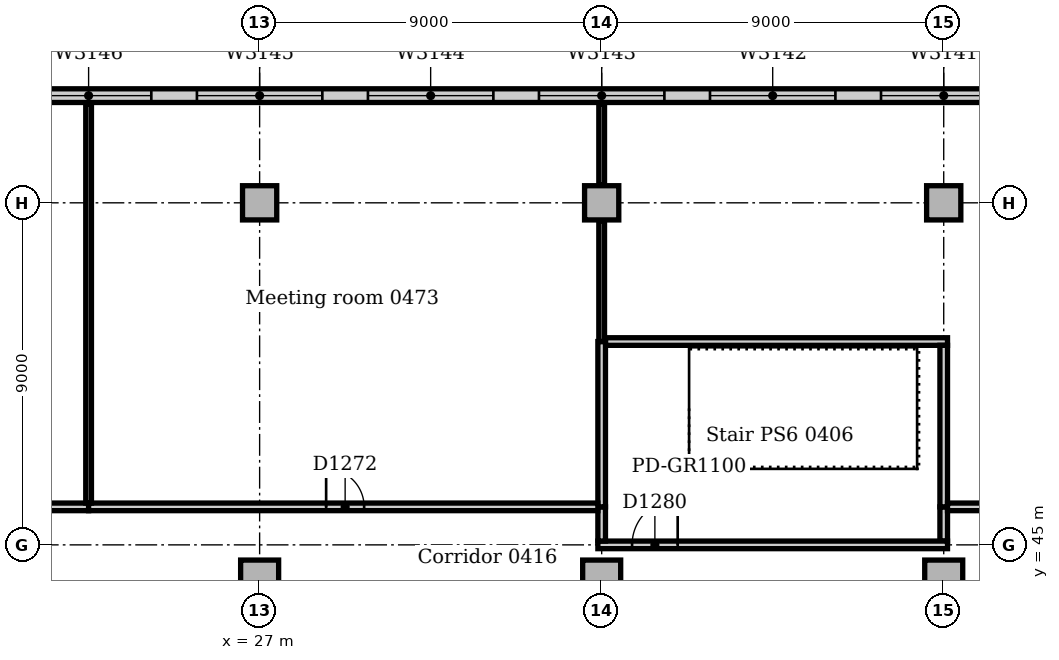
"""IFC4 building model, lengths in metres.
Left out: names, types, materials, properties, quantities, classifications, styles, units other than length and angle.
Written with IfcOpenShell. Run it as: python <this file> out.ifc"""

import sys

from ifc_helpers import new_model, si_unit, direction, frame, frame_2d, origin, origin_2d, place, context, subcontext, project, spatial, rectangle, extrude, element, fill, save


model = new_model("IFC4")
c1 = context("Model", 3, precision=1e-05, world=origin(), true_north=direction((0.0, 1.0)))
c2 = subcontext(c1, "Body", "Model", "MODEL_VIEW")
j1 = project(units=[si_unit("LENGTHUNIT", "METRE"), si_unit("PLANEANGLEUNIT", "RADIAN")], contexts=[c1])
p1 = place(None, origin())
s1 = spatial("IfcSite", under=j1, at=p1, CompositionType="ELEMENT")
p2 = place(p1, origin())
s2 = spatial("IfcBuilding", under=s1, at=p2, CompositionType="ELEMENT")
p3 = place(p2, frame((0.0, 0.0, 21.0)))
s3 = spatial("IfcBuildingStorey", under=s2, at=p3, CompositionType="ELEMENT", Elevation=21.0)
for number, where, z_axis, x_axis in (
    (1, (27.0, 44.1, 0.0), (0.0, 0.0, 1.0), (1.0, 0.0, 0.0)),
    (2, (36.0, 44.1, 0.0), (0.0, 0.0, 1.0), (1.0, 0.0, 0.0)),
    (3, (45.0, 44.1, 0.0), (0.0, 0.0, 1.0), (1.0, 0.0, 0.0)),
):
    element("IfcColumn", number, at=place(p3, frame(where, z_axis=z_axis, x_axis=x_axis)), inside=s3, PredefinedType="COLUMN", context=c2, shape_type="SweptSolid", body=[
        extrude(rectangle(XDim=1.0, YDim=1.0, at=origin_2d()), origin(), (0.0, 0.0, 1.0), 4.85),
    ])
for number, where, z_axis, x_axis in (
    (4, (27.0, 54.0, 0.0), (0.0, 0.0, 1.0), (1.0, 0.0, 0.0)),
    (5, (36.0, 54.0, 0.0), (0.0, 0.0, 1.0), (1.0, 0.0, 0.0)),
    (6, (45.0, 54.0, 0.0), (0.0, 0.0, 1.0), (1.0, 0.0, 0.0)),
):
    element("IfcColumn", number, at=place(p3, frame(where, z_axis=z_axis, x_axis=x_axis)), inside=s3, PredefinedType="COLUMN", context=c2, shape_type="SweptSolid", body=[
        extrude(rectangle(XDim=0.9, YDim=0.9, at=origin_2d()), origin(), (0.0, 0.0, 1.0), 4.7),
    ])
p4 = place(p3, frame((63.0, 56.82, 0.0), z_axis=(0.0, 0.0, 1.0), x_axis=(-1.0, 0.0, 0.0)))
e7 = element("IfcWall", 7, at=p4, inside=s3, PredefinedType="STANDARD", context=c2, shape_type="SweptSolid", body=[
    extrude(rectangle(XDim=144.0, YDim=0.36, at=frame_2d((72.0, 0.0))), origin(), (0.0, 0.0, 1.0), 4.85),
])
p5 = place(p4, frame((2.85, 0.0, 0.9)))
e8 = element("IfcOpeningElement", 8, at=p5, cuts=e7, PredefinedType="OPENING", context=c2, shape_type="SweptSolid", body=[
    extrude(rectangle(XDim=3.3, YDim=2.4, at=frame_2d((1.65, 1.2))), frame((0.0, 0.19, 0.0), z_axis=(0.0, -1.0, 0.0), x_axis=(1.0, 0.0, 0.0)), (0.0, 0.0, 1.0), 0.38),
])
p6 = place(p4, frame((7.35, 0.0, 0.9)))
e9 = element("IfcOpeningElement", 9, at=p6, cuts=e7, PredefinedType="OPENING", context=c2, shape_type="SweptSolid", body=[
    extrude(rectangle(XDim=3.3, YDim=2.4, at=frame_2d((1.65, 1.2))), frame((0.0, 0.19, 0.0), z_axis=(0.0, -1.0, 0.0), x_axis=(1.0, 0.0, 0.0)), (0.0, 0.0, 1.0), 0.38),
])
p7 = place(p4, frame((11.85, 0.0, 0.9)))
e10 = element("IfcOpeningElement", 10, at=p7, cuts=e7, PredefinedType="OPENING", context=c2, shape_type="SweptSolid", body=[
    extrude(rectangle(XDim=3.3, YDim=2.4, at=frame_2d((1.65, 1.2))), frame((0.0, 0.19, 0.0), z_axis=(0.0, -1.0, 0.0), x_axis=(1.0, 0.0, 0.0)), (0.0, 0.0, 1.0), 0.38),
])
p8 = place(p4, frame((16.35, 0.0, 0.9)))
e11 = element("IfcOpeningElement", 11, at=p8, cuts=e7, PredefinedType="OPENING", context=c2, shape_type="SweptSolid", body=[
    extrude(rectangle(XDim=3.3, YDim=2.4, at=frame_2d((1.65, 1.2))), frame((0.0, 0.19, 0.0), z_axis=(0.0, -1.0, 0.0), x_axis=(1.0, 0.0, 0.0)), (0.0, 0.0, 1.0), 0.38),
])
p9 = place(p4, frame((20.85, 0.0, 0.9)))
e12 = element("IfcOpeningElement", 12, at=p9, cuts=e7, PredefinedType="OPENING", context=c2, shape_type="SweptSolid", body=[
    extrude(rectangle(XDim=3.3, YDim=2.4, at=frame_2d((1.65, 1.2))), frame((0.0, 0.19, 0.0), z_axis=(0.0, -1.0, 0.0), x_axis=(1.0, 0.0, 0.0)), (0.0, 0.0, 1.0), 0.38),
])
p10 = place(p4, frame((25.35, 0.0, 0.9)))
e13 = element("IfcOpeningElement", 13, at=p10, cuts=e7, PredefinedType="OPENING", context=c2, shape_type="SweptSolid", body=[
    extrude(rectangle(XDim=3.3, YDim=2.4, at=frame_2d((1.65, 1.2))), frame((0.0, 0.19, 0.0), z_axis=(0.0, -1.0, 0.0), x_axis=(1.0, 0.0, 0.0)), (0.0, 0.0, 1.0), 0.38),
])
p11 = place(p4, frame((29.85, 0.0, 0.9)))
e14 = element("IfcOpeningElement", 14, at=p11, cuts=e7, PredefinedType="OPENING", context=c2, shape_type="SweptSolid", body=[
    extrude(rectangle(XDim=3.3, YDim=2.4, at=frame_2d((1.65, 1.2))), frame((0.0, 0.19, 0.0), z_axis=(0.0, -1.0, 0.0), x_axis=(1.0, 0.0, 0.0)), (0.0, 0.0, 1.0), 0.38),
])
p12 = place(p4, frame((34.35, 0.0, 0.9)))
e15 = element("IfcOpeningElement", 15, at=p12, cuts=e7, PredefinedType="OPENING", context=c2, shape_type="SweptSolid", body=[
    extrude(rectangle(XDim=3.3, YDim=2.4, at=frame_2d((1.65, 1.2))), frame((0.0, 0.19, 0.0), z_axis=(0.0, -1.0, 0.0), x_axis=(1.0, 0.0, 0.0)), (0.0, 0.0, 1.0), 0.38),
])
p13 = place(p4, frame((38.85, 0.0, 0.9)))
e16 = element("IfcOpeningElement", 16, at=p13, cuts=e7, PredefinedType="OPENING", context=c2, shape_type="SweptSolid", body=[
    extrude(rectangle(XDim=3.3, YDim=2.4, at=frame_2d((1.65, 1.2))), frame((0.0, 0.19, 0.0), z_axis=(0.0, -1.0, 0.0), x_axis=(1.0, 0.0, 0.0)), (0.0, 0.0, 1.0), 0.38),
])
p14 = place(p4, frame((43.35, 0.0, 0.9)))
e17 = element("IfcOpeningElement", 17, at=p14, cuts=e7, PredefinedType="OPENING", context=c2, shape_type="SweptSolid", body=[
    extrude(rectangle(XDim=3.3, YDim=2.4, at=frame_2d((1.65, 1.2))), frame((0.0, 0.19, 0.0), z_axis=(0.0, -1.0, 0.0), x_axis=(1.0, 0.0, 0.0)), (0.0, 0.0, 1.0), 0.38),
])
p15 = place(p4, frame((47.85, 0.0, 0.9)))
e18 = element("IfcOpeningElement", 18, at=p15, cuts=e7, PredefinedType="OPENING", context=c2, shape_type="SweptSolid", body=[
    extrude(rectangle(XDim=3.3, YDim=2.4, at=frame_2d((1.65, 1.2))), frame((0.0, 0.19, 0.0), z_axis=(0.0, -1.0, 0.0), x_axis=(1.0, 0.0, 0.0)), (0.0, 0.0, 1.0), 0.38),
])
p16 = place(p4, frame((52.35, 0.0, 0.9)))
e19 = element("IfcOpeningElement", 19, at=p16, cuts=e7, PredefinedType="OPENING", context=c2, shape_type="SweptSolid", body=[
    extrude(rectangle(XDim=3.3, YDim=2.4, at=frame_2d((1.65, 1.2))), frame((0.0, 0.19, 0.0), z_axis=(0.0, -1.0, 0.0), x_axis=(1.0, 0.0, 0.0)), (0.0, 0.0, 1.0), 0.38),
])
p17 = place(p4, frame((56.85, 0.0, 0.9)))
e20 = element("IfcOpeningElement", 20, at=p17, cuts=e7, PredefinedType="OPENING", context=c2, shape_type="SweptSolid", body=[
    extrude(rectangle(XDim=3.3, YDim=2.4, at=frame_2d((1.65, 1.2))), frame((0.0, 0.19, 0.0), z_axis=(0.0, -1.0, 0.0), x_axis=(1.0, 0.0, 0.0)), (0.0, 0.0, 1.0), 0.38),
])
p18 = place(p4, frame((61.35, 0.0, 0.9)))
e21 = element("IfcOpeningElement", 21, at=p18, cuts=e7, PredefinedType="OPENING", context=c2, shape_type="SweptSolid", body=[
    extrude(rectangle(XDim=3.3, YDim=2.4, at=frame_2d((1.65, 1.2))), frame((0.0, 0.19, 0.0), z_axis=(0.0, -1.0, 0.0), x_axis=(1.0, 0.0, 0.0)), (0.0, 0.0, 1.0), 0.38),
])
p19 = place(p4, frame((65.85, 0.0, 0.9)))
e22 = element("IfcOpeningElement", 22, at=p19, cuts=e7, PredefinedType="OPENING", context=c2, shape_type="SweptSolid", body=[
    extrude(rectangle(XDim=3.3, YDim=2.4, at=frame_2d((1.65, 1.2))), frame((0.0, 0.19, 0.0), z_axis=(0.0, -1.0, 0.0), x_axis=(1.0, 0.0, 0.0)), (0.0, 0.0, 1.0), 0.38),
])
p20 = place(p4, frame((70.35, 0.0, 0.9)))
e23 = element("IfcOpeningElement", 23, at=p20, cuts=e7, PredefinedType="OPENING", context=c2, shape_type="SweptSolid", body=[
    extrude(rectangle(XDim=3.3, YDim=2.4, at=frame_2d((1.65, 1.2))), frame((0.0, 0.19, 0.0), z_axis=(0.0, -1.0, 0.0), x_axis=(1.0, 0.0, 0.0)), (0.0, 0.0, 1.0), 0.38),
])
p21 = place(p4, frame((74.85, 0.0, 0.9)))
e24 = element("IfcOpeningElement", 24, at=p21, cuts=e7, PredefinedType="OPENING", context=c2, shape_type="SweptSolid", body=[
    extrude(rectangle(XDim=3.3, YDim=2.4, at=frame_2d((1.65, 1.2))), frame((0.0, 0.19, 0.0), z_axis=(0.0, -1.0, 0.0), x_axis=(1.0, 0.0, 0.0)), (0.0, 0.0, 1.0), 0.38),
])
p22 = place(p4, frame((79.35, 0.0, 0.9)))
e25 = element("IfcOpeningElement", 25, at=p22, cuts=e7, PredefinedType="OPENING", context=c2, shape_type="SweptSolid", body=[
    extrude(rectangle(XDim=3.3, YDim=2.4, at=frame_2d((1.65, 1.2))), frame((0.0, 0.19, 0.0), z_axis=(0.0, -1.0, 0.0), x_axis=(1.0, 0.0, 0.0)), (0.0, 0.0, 1.0), 0.38),
])
p23 = place(p4, frame((83.85, 0.0, 0.9)))
e26 = element("IfcOpeningElement", 26, at=p23, cuts=e7, PredefinedType="OPENING", context=c2, shape_type="SweptSolid", body=[
    extrude(rectangle(XDim=3.3, YDim=2.4, at=frame_2d((1.65, 1.2))), frame((0.0, 0.19, 0.0), z_axis=(0.0, -1.0, 0.0), x_axis=(1.0, 0.0, 0.0)), (0.0, 0.0, 1.0), 0.38),
])
p24 = place(p4, frame((88.35, 0.0, 0.9)))
e27 = element("IfcOpeningElement", 27, at=p24, cuts=e7, PredefinedType="OPENING", context=c2, shape_type="SweptSolid", body=[
    extrude(rectangle(XDim=3.3, YDim=2.4, at=frame_2d((1.65, 1.2))), frame((0.0, 0.19, 0.0), z_axis=(0.0, -1.0, 0.0), x_axis=(1.0, 0.0, 0.0)), (0.0, 0.0, 1.0), 0.38),
])
p25 = place(p4, frame((92.85, 0.0, 0.9)))
e28 = element("IfcOpeningElement", 28, at=p25, cuts=e7, PredefinedType="OPENING", context=c2, shape_type="SweptSolid", body=[
    extrude(rectangle(XDim=3.3, YDim=2.4, at=frame_2d((1.65, 1.2))), frame((0.0, 0.19, 0.0), z_axis=(0.0, -1.0, 0.0), x_axis=(1.0, 0.0, 0.0)), (0.0, 0.0, 1.0), 0.38),
])
p26 = place(p4, frame((97.35, 0.0, 0.9)))
e29 = element("IfcOpeningElement", 29, at=p26, cuts=e7, PredefinedType="OPENING", context=c2, shape_type="SweptSolid", body=[
    extrude(rectangle(XDim=3.3, YDim=2.4, at=frame_2d((1.65, 1.2))), frame((0.0, 0.19, 0.0), z_axis=(0.0, -1.0, 0.0), x_axis=(1.0, 0.0, 0.0)), (0.0, 0.0, 1.0), 0.38),
])
p27 = place(p4, frame((101.85, 0.0, 0.9)))
e30 = element("IfcOpeningElement", 30, at=p27, cuts=e7, PredefinedType="OPENING", context=c2, shape_type="SweptSolid", body=[
    extrude(rectangle(XDim=3.3, YDim=2.4, at=frame_2d((1.65, 1.2))), frame((0.0, 0.19, 0.0), z_axis=(0.0, -1.0, 0.0), x_axis=(1.0, 0.0, 0.0)), (0.0, 0.0, 1.0), 0.38),
])
p28 = place(p4, frame((106.35, 0.0, 0.9)))
e31 = element("IfcOpeningElement", 31, at=p28, cuts=e7, PredefinedType="OPENING", context=c2, shape_type="SweptSolid", body=[
    extrude(rectangle(XDim=3.3, YDim=2.4, at=frame_2d((1.65, 1.2))), frame((0.0, 0.19, 0.0), z_axis=(0.0, -1.0, 0.0), x_axis=(1.0, 0.0, 0.0)), (0.0, 0.0, 1.0), 0.38),
])
p29 = place(p4, frame((110.85, 0.0, 0.9)))
e32 = element("IfcOpeningElement", 32, at=p29, cuts=e7, PredefinedType="OPENING", context=c2, shape_type="SweptSolid", body=[
    extrude(rectangle(XDim=3.3, YDim=2.4, at=frame_2d((1.65, 1.2))), frame((0.0, 0.19, 0.0), z_axis=(0.0, -1.0, 0.0), x_axis=(1.0, 0.0, 0.0)), (0.0, 0.0, 1.0), 0.38),
])
p30 = place(p4, frame((115.35, 0.0, 0.9)))
e33 = element("IfcOpeningElement", 33, at=p30, cuts=e7, PredefinedType="OPENING", context=c2, shape_type="SweptSolid", body=[
    extrude(rectangle(XDim=3.3, YDim=2.4, at=frame_2d((1.65, 1.2))), frame((0.0, 0.19, 0.0), z_axis=(0.0, -1.0, 0.0), x_axis=(1.0, 0.0, 0.0)), (0.0, 0.0, 1.0), 0.38),
])
p31 = place(p4, frame((119.85, 0.0, 0.9)))
e34 = element("IfcOpeningElement", 34, at=p31, cuts=e7, PredefinedType="OPENING", context=c2, shape_type="SweptSolid", body=[
    extrude(rectangle(XDim=3.3, YDim=2.4, at=frame_2d((1.65, 1.2))), frame((0.0, 0.19, 0.0), z_axis=(0.0, -1.0, 0.0), x_axis=(1.0, 0.0, 0.0)), (0.0, 0.0, 1.0), 0.38),
])
p32 = place(p4, frame((124.35, 0.0, 0.9)))
e35 = element("IfcOpeningElement", 35, at=p32, cuts=e7, PredefinedType="OPENING", context=c2, shape_type="SweptSolid", body=[
    extrude(rectangle(XDim=3.3, YDim=2.4, at=frame_2d((1.65, 1.2))), frame((0.0, 0.19, 0.0), z_axis=(0.0, -1.0, 0.0), x_axis=(1.0, 0.0, 0.0)), (0.0, 0.0, 1.0), 0.38),
])
p33 = place(p4, frame((128.85, 0.0, 0.9)))
e36 = element("IfcOpeningElement", 36, at=p33, cuts=e7, PredefinedType="OPENING", context=c2, shape_type="SweptSolid", body=[
    extrude(rectangle(XDim=3.3, YDim=2.4, at=frame_2d((1.65, 1.2))), frame((0.0, 0.19, 0.0), z_axis=(0.0, -1.0, 0.0), x_axis=(1.0, 0.0, 0.0)), (0.0, 0.0, 1.0), 0.38),
])
p34 = place(p4, frame((133.35, 0.0, 0.9)))
e37 = element("IfcOpeningElement", 37, at=p34, cuts=e7, PredefinedType="OPENING", context=c2, shape_type="SweptSolid", body=[
    extrude(rectangle(XDim=3.3, YDim=2.4, at=frame_2d((1.65, 1.2))), frame((0.0, 0.19, 0.0), z_axis=(0.0, -1.0, 0.0), x_axis=(1.0, 0.0, 0.0)), (0.0, 0.0, 1.0), 0.38),
])
p35 = place(p4, frame((137.85, 0.0, 0.9)))
e38 = element("IfcOpeningElement", 38, at=p35, cuts=e7, PredefinedType="OPENING", context=c2, shape_type="SweptSolid", body=[
    extrude(rectangle(XDim=3.3, YDim=2.4, at=frame_2d((1.65, 1.2))), frame((0.0, 0.19, 0.0), z_axis=(0.0, -1.0, 0.0), x_axis=(1.0, 0.0, 0.0)), (0.0, 0.0, 1.0), 0.38),
])
p36 = place(p3, frame((45.0, 45.1, 0.0), z_axis=(0.0, 0.0, 1.0), x_axis=(0.0, 1.0, 0.0)))
e39 = element("IfcWall", 39, at=p36, inside=s3, PredefinedType="SOLIDWALL", context=c2, shape_type="SweptSolid", body=[
    extrude(rectangle(XDim=0.9, YDim=0.2, at=frame_2d((0.45, 0.0))), origin(), (0.0, 0.0, 1.0), 4.7),
])
p37 = place(p3, frame((35.9, 45.0, 0.0), z_axis=(0.0, 0.0, 1.0), x_axis=(1.0, 0.0, 0.0)))
e40 = element("IfcWall", 40, at=p37, inside=s3, PredefinedType="SOLIDWALL", context=c2, shape_type="SweptSolid", body=[
    extrude(rectangle(XDim=9.2, YDim=0.2, at=frame_2d((4.6, 0.0))), origin(), (0.0, 0.0, 1.0), 4.85),
])
p38 = place(p37, frame((0.9, 0.0, 0.0)))
e41 = element("IfcOpeningElement", 41, at=p38, cuts=e40, PredefinedType="OPENING", context=c2, shape_type="SweptSolid", body=[
    extrude(rectangle(XDim=1.2, YDim=2.1, at=frame_2d((0.6, 1.05))), frame((0.0, 0.11, 0.0), z_axis=(0.0, -1.0, 0.0), x_axis=(1.0, 0.0, 0.0)), (0.0, 0.0, 1.0), 0.22),
])
p39 = place(p3, frame((36.0, 45.1, 0.0), z_axis=(0.0, 0.0, 1.0), x_axis=(0.0, 1.0, 0.0)))
e42 = element("IfcWall", 42, at=p39, inside=s3, PredefinedType="SOLIDWALL", context=c2, shape_type="SweptSolid", body=[
    extrude(rectangle(XDim=0.9, YDim=0.2, at=frame_2d((0.45, 0.0))), origin(), (0.0, 0.0, 1.0), 4.7),
])
p40 = place(p3, frame((36.1, 50.35, 0.0), z_axis=(0.0, 0.0, 1.0), x_axis=(1.0, 0.0, 0.0)))
e43 = element("IfcWall", 43, at=p40, inside=s3, PredefinedType="SOLIDWALL", context=c2, shape_type="SweptSolid", body=[
    extrude(rectangle(XDim=9.0, YDim=0.2, at=frame_2d((4.5, 0.0))), origin(), (0.0, 0.0, 1.0), 4.7),
])
p41 = place(p3, frame((45.0, 46.0, 0.0), z_axis=(0.0, 0.0, 1.0), x_axis=(0.0, 1.0, 0.0)))
e44 = element("IfcWall", 44, at=p41, inside=s3, PredefinedType="SOLIDWALL", context=c2, shape_type="SweptSolid", body=[
    extrude(rectangle(XDim=4.25, YDim=0.2, at=frame_2d((2.125, 0.0))), origin(), (0.0, 0.0, 1.0), 4.7),
])
p42 = place(p3, frame((36.0, 46.0, 0.0), z_axis=(0.0, 0.0, 1.0), x_axis=(0.0, 1.0, 0.0)))
e45 = element("IfcWall", 45, at=p42, inside=s3, PredefinedType="SOLIDWALL", context=c2, shape_type="SweptSolid", body=[
    extrude(rectangle(XDim=4.35, YDim=0.2, at=frame_2d((2.175, 0.0))), origin(), (0.0, 0.0, 1.0), 4.7),
])
p43 = place(p3, frame((45.1, 46.0, 0.0), z_axis=(0.0, 0.0, 1.0), x_axis=(1.0, 0.0, 0.0)))
e46 = element("IfcWall", 46, at=p43, inside=s3, PredefinedType="PARTITIONING", context=c2, shape_type="SweptSolid", body=[
    extrude(rectangle(XDim=8.8, YDim=0.2, at=frame_2d((4.4, 0.0))), origin(), (0.0, 0.0, 1.0), 4.7),
])
p44 = place(p43, frame((3.5, 0.0, 0.0)))
e47 = element("IfcOpeningElement", 47, at=p44, cuts=e46, PredefinedType="OPENING", context=c2, shape_type="SweptSolid", body=[
    extrude(rectangle(XDim=1.8, YDim=2.1, at=frame_2d((0.9, 1.05))), frame((0.0, 0.11, 0.0), z_axis=(0.0, -1.0, 0.0), x_axis=(1.0, 0.0, 0.0)), (0.0, 0.0, 1.0), 0.22),
])
p45 = place(p3, frame((9.0, 46.0, 0.0), z_axis=(0.0, 0.0, 1.0), x_axis=(1.0, 0.0, 0.0)))
e48 = element("IfcWall", 48, at=p45, inside=s3, PredefinedType="PARTITIONING", context=c2, shape_type="SweptSolid", body=[
    extrude(rectangle(XDim=13.5, YDim=0.2, at=frame_2d((6.75, 0.0))), origin(), (0.0, 0.0, 1.0), 4.7),
])
p46 = place(p45, frame((6.25, 0.0, 0.0)))
e49 = element("IfcOpeningElement", 49, at=p46, cuts=e48, PredefinedType="OPENING", context=c2, shape_type="SweptSolid", body=[
    extrude(rectangle(XDim=1.0, YDim=2.1, at=frame_2d((0.5, 1.05))), frame((0.0, 0.11, 0.0), z_axis=(0.0, -1.0, 0.0), x_axis=(1.0, 0.0, 0.0)), (0.0, 0.0, 1.0), 0.22),
])
p47 = place(p3, frame((22.5, 46.0, 0.0), z_axis=(0.0, 0.0, 1.0), x_axis=(1.0, 0.0, 0.0)))
e50 = element("IfcWall", 50, at=p47, inside=s3, PredefinedType="PARTITIONING", context=c2, shape_type="SweptSolid", body=[
    extrude(rectangle(XDim=13.4, YDim=0.2, at=frame_2d((6.7, 0.0))), origin(), (0.0, 0.0, 1.0), 4.7),
])
p48 = place(p47, frame((6.25, 0.0, 0.0)))
e51 = element("IfcOpeningElement", 51, at=p48, cuts=e50, PredefinedType="OPENING", context=c2, shape_type="SweptSolid", body=[
    extrude(rectangle(XDim=1.0, YDim=2.1, at=frame_2d((0.5, 1.05))), frame((0.0, 0.11, 0.0), z_axis=(0.0, -1.0, 0.0), x_axis=(1.0, 0.0, 0.0)), (0.0, 0.0, 1.0), 0.22),
])
p49 = place(p3, frame((36.0, 50.35, 0.0), z_axis=(0.0, 0.0, 1.0), x_axis=(0.0, 1.0, 0.0)))
e52 = element("IfcWall", 52, at=p49, inside=s3, PredefinedType="PARTITIONING", context=c2, shape_type="SweptSolid", body=[
    extrude(rectangle(XDim=3.18, YDim=0.15, at=frame_2d((1.59, 0.0))), origin(), (0.0, 0.0, 1.0), 4.7),
])
p50 = place(p3, frame((36.0, 54.47, 0.0), z_axis=(0.0, 0.0, 1.0), x_axis=(0.0, 1.0, 0.0)))
e53 = element("IfcWall", 53, at=p50, inside=s3, PredefinedType="PARTITIONING", context=c2, shape_type="SweptSolid", body=[
    extrude(rectangle(XDim=2.13, YDim=0.15, at=frame_2d((1.065, 0.0))), origin(), (0.0, 0.0, 1.0), 4.7),
])
p51 = place(p3, frame((22.5, 46.1, 0.0), z_axis=(0.0, 0.0, 1.0), x_axis=(0.0, 1.0, 0.0)))
e54 = element("IfcWall", 54, at=p51, inside=s3, PredefinedType="PARTITIONING", context=c2, shape_type="SweptSolid", body=[
    extrude(rectangle(XDim=10.5, YDim=0.15, at=frame_2d((5.25, 0.0))), origin(), (0.0, 0.0, 1.0), 4.7),
])
p52 = place(p8, origin())
e55 = element("IfcWindow", 55, at=p52, inside=s3, PartitioningType="SINGLE_PANEL", PredefinedType="WINDOW", context=c2, shape_type="SweptSolid", body=[
    extrude(rectangle(XDim=3.3, YDim=2.4, at=frame_2d((1.65, 1.2))), frame((0.0, 0.13, 0.0), z_axis=(0.0, -1.0, 0.0), x_axis=(1.0, 0.0, 0.0)), (0.0, 0.0, 1.0), 0.06),
])
fill(e11, e55)
p53 = place(p9, origin())
e56 = element("IfcWindow", 56, at=p53, inside=s3, PartitioningType="SINGLE_PANEL", PredefinedType="WINDOW", context=c2, shape_type="SweptSolid", body=[
    extrude(rectangle(XDim=3.3, YDim=2.4, at=frame_2d((1.65, 1.2))), frame((0.0, 0.13, 0.0), z_axis=(0.0, -1.0, 0.0), x_axis=(1.0, 0.0, 0.0)), (0.0, 0.0, 1.0), 0.06),
])
fill(e12, e56)
p54 = place(p10, origin())
e57 = element("IfcWindow", 57, at=p54, inside=s3, PartitioningType="SINGLE_PANEL", PredefinedType="WINDOW", context=c2, shape_type="SweptSolid", body=[
    extrude(rectangle(XDim=3.3, YDim=2.4, at=frame_2d((1.65, 1.2))), frame((0.0, 0.13, 0.0), z_axis=(0.0, -1.0, 0.0), x_axis=(1.0, 0.0, 0.0)), (0.0, 0.0, 1.0), 0.06),
])
fill(e13, e57)
p55 = place(p11, origin())
e58 = element("IfcWindow", 58, at=p55, inside=s3, PartitioningType="SINGLE_PANEL", PredefinedType="WINDOW", context=c2, shape_type="SweptSolid", body=[
    extrude(rectangle(XDim=3.3, YDim=2.4, at=frame_2d((1.65, 1.2))), frame((0.0, 0.13, 0.0), z_axis=(0.0, -1.0, 0.0), x_axis=(1.0, 0.0, 0.0)), (0.0, 0.0, 1.0), 0.06),
])
fill(e14, e58)
p56 = place(p12, origin())
e59 = element("IfcWindow", 59, at=p56, inside=s3, PartitioningType="SINGLE_PANEL", PredefinedType="WINDOW", context=c2, shape_type="SweptSolid", body=[
    extrude(rectangle(XDim=3.3, YDim=2.4, at=frame_2d((1.65, 1.2))), frame((0.0, 0.13, 0.0), z_axis=(0.0, -1.0, 0.0), x_axis=(1.0, 0.0, 0.0)), (0.0, 0.0, 1.0), 0.06),
])
fill(e15, e59)
p57 = place(p13, origin())
e60 = element("IfcWindow", 60, at=p57, inside=s3, PartitioningType="SINGLE_PANEL", PredefinedType="WINDOW", context=c2, shape_type="SweptSolid", body=[
    extrude(rectangle(XDim=3.3, YDim=2.4, at=frame_2d((1.65, 1.2))), frame((0.0, 0.13, 0.0), z_axis=(0.0, -1.0, 0.0), x_axis=(1.0, 0.0, 0.0)), (0.0, 0.0, 1.0), 0.06),
])
fill(e16, e60)
p58 = place(p48, origin())
e61 = element("IfcDoor", 61, at=p58, inside=s3, OperationType="SINGLE_SWING_LEFT", PredefinedType="DOOR", context=c2, shape_type="SweptSolid", body=[
    extrude(rectangle(XDim=1.0, YDim=2.1, at=frame_2d((0.5, 1.05))), frame((0.0, 0.025, 0.0), z_axis=(0.0, -1.0, 0.0), x_axis=(1.0, 0.0, 0.0)), (0.0, 0.0, 1.0), 0.05),
])
fill(e51, e61)
p59 = place(p38, origin())
e62 = element("IfcDoor", 62, at=p59, inside=s3, OperationType="SINGLE_SWING_RIGHT", PredefinedType="DOOR", context=c2, shape_type="SweptSolid", body=[
    extrude(rectangle(XDim=1.2, YDim=2.1, at=frame_2d((0.6, 1.05))), frame((0.0, 0.025, 0.0), z_axis=(0.0, -1.0, 0.0), x_axis=(1.0, 0.0, 0.0)), (0.0, 0.0, 1.0), 0.05),
])
fill(e41, e62)
save(model, sys.argv[1])
